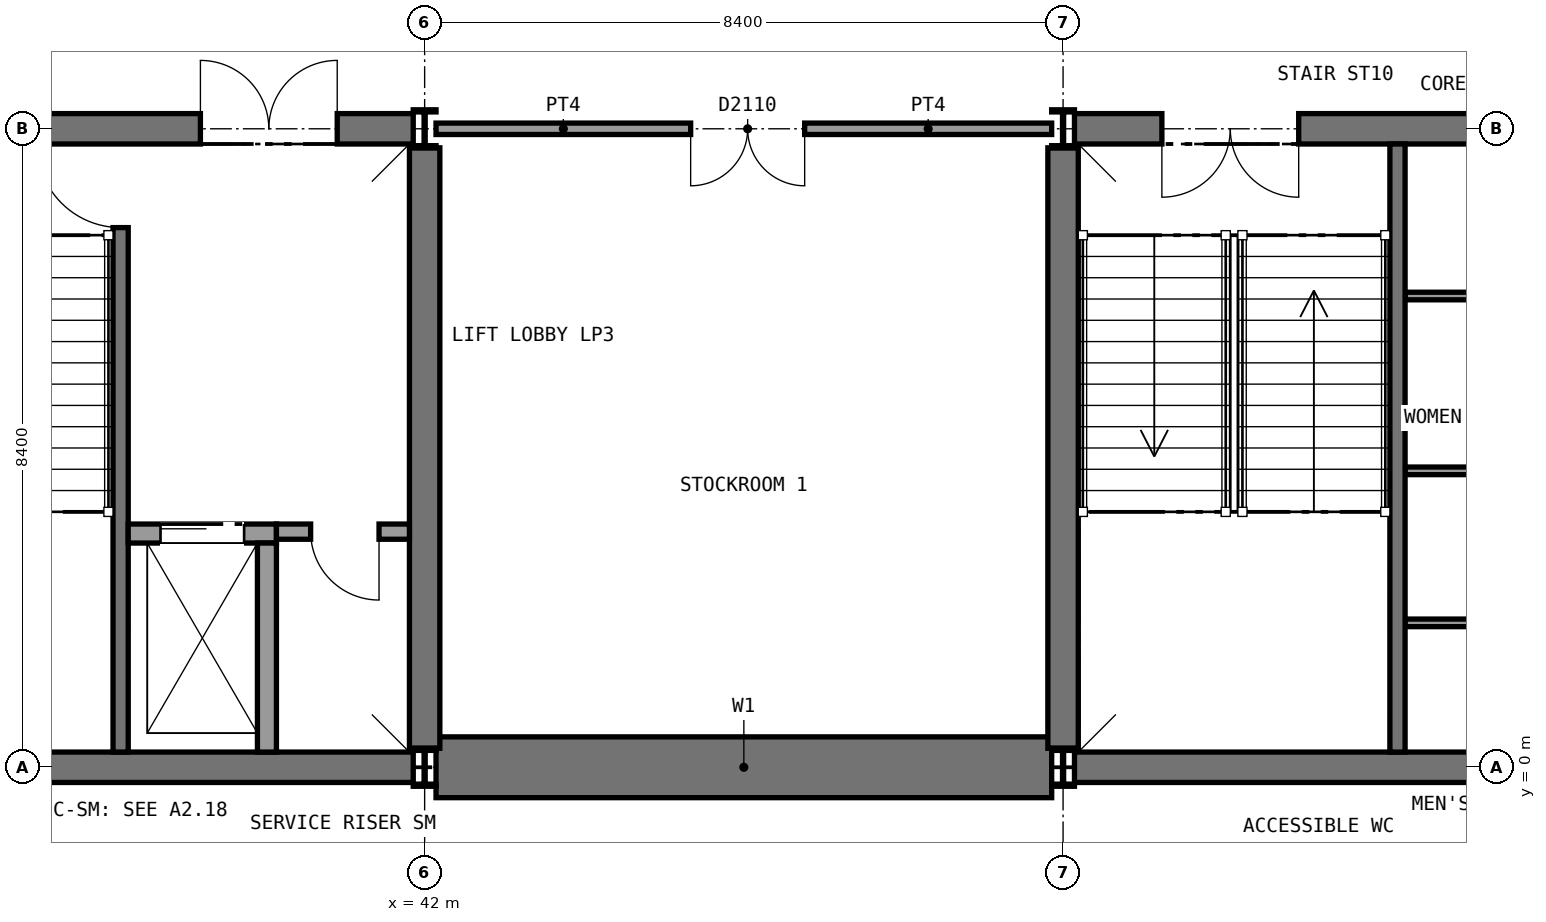
"""IFC4 building model, lengths in metres.
Left out: names, types, materials, properties, quantities, classifications, styles, units other than length and angle.
Written with IfcOpenShell. Run it as: python <this file> out.ifc"""

import sys

from ifc_helpers import new_model, si_unit, direction, frame, frame_2d, origin, origin_2d, place, context, subcontext, project, spatial, rectangle, i_section, extrude, element, fill, save


model = new_model("IFC4")
c1 = context("Model", 3, precision=1e-05, world=origin(), true_north=direction((0.0, 1.0)))
c2 = subcontext(c1, "Body", "Model", "MODEL_VIEW")
j1 = project(units=[si_unit("LENGTHUNIT", "METRE"), si_unit("PLANEANGLEUNIT", "RADIAN")], contexts=[c1])
p1 = place(None, origin())
s1 = spatial("IfcSite", under=j1, at=p1, CompositionType="ELEMENT")
p2 = place(p1, origin())
s2 = spatial("IfcBuilding", under=s1, at=p2, CompositionType="ELEMENT")
p3 = place(p2, frame((0.0, 0.0, -4.9)))
s3 = spatial("IfcBuildingStorey", under=s2, at=p3, CompositionType="ELEMENT", Elevation=-4.9)
p4 = place(p3, frame((42.15, 0.0, 0.0), z_axis=(0.0, 0.0, 1.0), x_axis=(1.0, 0.0, 0.0)))
e1 = element("IfcWall", 1, at=p4, inside=s3, PredefinedType="SOLIDWALL", context=c2, shape_type="SweptSolid", body=[
    extrude(rectangle(XDim=8.1, YDim=0.8, at=frame_2d((4.05, 0.0))), origin(), (0.0, 0.0, 1.0), 4.75),
])
p5 = place(p3, frame((33.75, 0.0, 0.0), z_axis=(0.0, 0.0, 1.0), x_axis=(1.0, 0.0, 0.0)))
e2 = element("IfcWall", 2, at=p5, inside=s3, PredefinedType="SHEAR", context=c2, shape_type="SweptSolid", body=[
    extrude(rectangle(XDim=8.1, YDim=0.4, at=frame_2d((4.05, 0.0))), origin(), (0.0, 0.0, 1.0), 4.75),
])
p6 = place(p3, frame((33.75, 8.4, 0.0), z_axis=(0.0, 0.0, 1.0), x_axis=(1.0, 0.0, 0.0)))
e3 = element("IfcWall", 3, at=p6, inside=s3, PredefinedType="SHEAR", context=c2, shape_type="SweptSolid", body=[
    extrude(rectangle(XDim=8.1, YDim=0.4, at=frame_2d((4.05, 0.0))), origin(), (0.0, 0.0, 1.0), 4.75),
])
p7 = place(p6, frame((1.15, 0.0, 0.0)))
e4 = element("IfcOpeningElement", 4, at=p7, cuts=e3, PredefinedType="OPENING", context=c2, shape_type="SweptSolid", body=[
    extrude(rectangle(XDim=1.8, YDim=2.1, at=frame_2d((0.9, 1.05))), frame((0.0, 0.21, 0.0), z_axis=(0.0, -1.0, 0.0), x_axis=(1.0, 0.0, 0.0)), (0.0, 0.0, 1.0), 0.42),
])
p8 = place(p6, frame((5.3, 0.0, 0.0)))
e5 = element("IfcOpeningElement", 5, at=p8, cuts=e3, PredefinedType="OPENING", context=c2, shape_type="SweptSolid", body=[
    extrude(rectangle(XDim=1.8, YDim=2.1, at=frame_2d((0.9, 1.05))), frame((0.0, 0.21, 0.0), z_axis=(0.0, -1.0, 0.0), x_axis=(1.0, 0.0, 0.0)), (0.0, 0.0, 1.0), 0.42),
])
p9 = place(p3, frame((42.0, 0.25, 0.0), z_axis=(0.0, 0.0, 1.0), x_axis=(0.0, 1.0, 0.0)))
e6 = element("IfcWall", 6, at=p9, inside=s3, PredefinedType="SHEAR", context=c2, shape_type="SweptSolid", body=[
    extrude(rectangle(XDim=7.9, YDim=0.4, at=frame_2d((3.95, 0.0))), origin(), (0.0, 0.0, 1.0), 4.75),
])
p10 = place(p3, frame((50.55, 0.0, 0.0), z_axis=(0.0, 0.0, 1.0), x_axis=(1.0, 0.0, 0.0)))
e7 = element("IfcWall", 7, at=p10, inside=s3, PredefinedType="SHEAR", context=c2, shape_type="SweptSolid", body=[
    extrude(rectangle(XDim=8.1, YDim=0.4, at=frame_2d((4.05, 0.0))), origin(), (0.0, 0.0, 1.0), 4.75),
])
p11 = place(p3, frame((50.55, 8.4, 0.0), z_axis=(0.0, 0.0, 1.0), x_axis=(1.0, 0.0, 0.0)))
e8 = element("IfcWall", 8, at=p11, inside=s3, PredefinedType="SHEAR", context=c2, shape_type="SweptSolid", body=[
    extrude(rectangle(XDim=8.1, YDim=0.4, at=frame_2d((4.05, 0.0))), origin(), (0.0, 0.0, 1.0), 4.75),
])
p12 = place(p11, frame((1.15, 0.0, 0.0)))
e9 = element("IfcOpeningElement", 9, at=p12, cuts=e8, PredefinedType="OPENING", context=c2, shape_type="SweptSolid", body=[
    extrude(rectangle(XDim=1.8, YDim=2.1, at=frame_2d((0.9, 1.05))), frame((0.0, 0.21, 0.0), z_axis=(0.0, -1.0, 0.0), x_axis=(1.0, 0.0, 0.0)), (0.0, 0.0, 1.0), 0.42),
])
p13 = place(p11, frame((5.6, 0.0, 0.0)))
e10 = element("IfcOpeningElement", 10, at=p13, cuts=e8, PredefinedType="OPENING", context=c2, shape_type="SweptSolid", body=[
    extrude(rectangle(XDim=1.2, YDim=2.1, at=frame_2d((0.6, 1.05))), frame((0.0, 0.21, 0.0), z_axis=(0.0, -1.0, 0.0), x_axis=(1.0, 0.0, 0.0)), (0.0, 0.0, 1.0), 0.42),
])
p14 = place(p3, frame((50.4, 0.25, 0.0), z_axis=(0.0, 0.0, 1.0), x_axis=(0.0, 1.0, 0.0)))
e11 = element("IfcWall", 11, at=p14, inside=s3, PredefinedType="SHEAR", context=c2, shape_type="SweptSolid", body=[
    extrude(rectangle(XDim=7.9, YDim=0.4, at=frame_2d((3.95, 0.0))), origin(), (0.0, 0.0, 1.0), 4.75),
])
for number, where, z_axis, x_axis in (
    (12, (42.0, 0.0, 0.0), (0.0, 0.0, 1.0), (1.0, 0.0, 0.0)),
    (13, (42.0, 8.4, 0.0), (0.0, 0.0, 1.0), (1.0, 0.0, 0.0)),
    (14, (50.4, 0.0, 0.0), (0.0, 0.0, 1.0), (1.0, 0.0, 0.0)),
    (15, (50.4, 8.4, 0.0), (0.0, 0.0, 1.0), (1.0, 0.0, 0.0)),
):
    element("IfcColumn", number, at=place(p3, frame(where, z_axis=z_axis, x_axis=x_axis)), inside=s3, PredefinedType="COLUMN", context=c2, shape_type="SweptSolid", body=[
        extrude(i_section(OverallWidth=0.3, OverallDepth=0.5, WebThickness=0.014, FlangeThickness=0.028, FilletRadius=0.027, at=origin_2d()), origin(), (0.0, 0.0, 1.0), 4.9),
    ])
p15 = place(p3, frame((54.9, 6.2, 0.0), z_axis=(0.0, 0.0, 1.0), x_axis=(1.0, 0.0, 0.0)))
e16 = element("IfcWall", 16, at=p15, inside=s3, PredefinedType="PARTITIONING", context=c2, shape_type="SweptSolid", body=[
    extrude(rectangle(XDim=2.4, YDim=0.1, at=frame_2d((1.2, 0.0))), origin(), (0.0, 0.0, 1.0), 4.68),
])
p16 = place(p15, frame((0.85, 0.0, 0.0)))
e17 = element("IfcOpeningElement", 17, at=p16, cuts=e16, PredefinedType="OPENING", context=c2, shape_type="SweptSolid", body=[
    extrude(rectangle(XDim=0.9, YDim=2.1, at=frame_2d((0.45, 1.05))), frame((0.0, 0.06, 0.0), z_axis=(0.0, -1.0, 0.0), x_axis=(1.0, 0.0, 0.0)), (0.0, 0.0, 1.0), 0.12),
])
for number, where, z_axis, x_axis in (
    (18, (54.9, 3.9, 0.0), (0.0, 0.0, 1.0), (1.0, 0.0, 0.0)),
    (19, (54.9, 1.9, 0.0), (0.0, 0.0, 1.0), (1.0, 0.0, 0.0)),
):
    element("IfcWall", number, at=place(p3, frame(where, z_axis=z_axis, x_axis=x_axis)), inside=s3, PredefinedType="PARTITIONING", context=c2, shape_type="SweptSolid", body=[
        extrude(rectangle(XDim=2.4, YDim=0.1, at=frame_2d((1.2, 0.0))), origin(), (0.0, 0.0, 1.0), 4.68),
    ])
p17 = place(p3, frame((42.15, 8.4, 0.0), z_axis=(0.0, 0.0, 1.0), x_axis=(1.0, 0.0, 0.0)))
e20 = element("IfcWall", 20, at=p17, inside=s3, PredefinedType="SOLIDWALL", context=c2, shape_type="SweptSolid", body=[
    extrude(rectangle(XDim=8.1, YDim=0.15, at=frame_2d((4.05, 0.0))), origin(), (0.0, 0.0, 1.0), 4.26),
])
p18 = place(p17, frame((3.35, 0.0, 0.0)))
e21 = element("IfcOpeningElement", 21, at=p18, cuts=e20, PredefinedType="OPENING", context=c2, shape_type="SweptSolid", body=[
    extrude(rectangle(XDim=1.5, YDim=2.1, at=frame_2d((0.75, 1.05))), frame((0.0, 0.085, 0.0), z_axis=(0.0, -1.0, 0.0), x_axis=(1.0, 0.0, 0.0)), (0.0, 0.0, 1.0), 0.17),
])
p19 = place(p3, frame((38.0, 0.2, 0.0), z_axis=(0.0, 0.0, 1.0), x_axis=(0.0, 1.0, 0.0)))
e22 = element("IfcWall", 22, at=p19, inside=s3, PredefinedType="SHEAR", context=c2, shape_type="SweptSolid", body=[
    extrude(rectangle(XDim=8.0, YDim=0.2, at=frame_2d((4.0, 0.0))), origin(), (0.0, 0.0, 1.0), 4.75),
])
p20 = place(p19, frame((6.9, 0.0, 0.0)))
e23 = element("IfcOpeningElement", 23, at=p20, cuts=e22, PredefinedType="OPENING", context=c2, shape_type="SweptSolid", body=[
    extrude(rectangle(XDim=1.11, YDim=2.1, at=frame_2d((0.555, 1.05))), frame((0.0, 0.11, 0.0), z_axis=(0.0, -1.0, 0.0), x_axis=(1.0, 0.0, 0.0)), (0.0, 0.0, 1.0), 0.22),
])
p21 = place(p3, frame((38.1, 3.075, 0.0), z_axis=(0.0, 0.0, 1.0), x_axis=(1.0, 0.0, 0.0)))
e24 = element("IfcWall", 24, at=p21, inside=s3, PredefinedType="SOLIDWALL", context=c2, shape_type="SweptSolid", body=[
    extrude(rectangle(XDim=1.95, YDim=0.25, at=frame_2d((0.975, 0.0))), origin(), (0.0, 0.0, 1.0), 4.9),
])
p22 = place(p21, frame((0.425, 0.0, 0.0)))
e25 = element("IfcOpeningElement", 25, at=p22, cuts=e24, PredefinedType="OPENING", context=c2, shape_type="SweptSolid", body=[
    extrude(rectangle(XDim=1.1, YDim=2.1, at=frame_2d((0.55, 1.05))), frame((0.0, 0.135, 0.0), z_axis=(0.0, -1.0, 0.0), x_axis=(1.0, 0.0, 0.0)), (0.0, 0.0, 1.0), 0.27),
])
p23 = place(p3, frame((39.925, 0.2, 0.0), z_axis=(0.0, 0.0, 1.0), x_axis=(0.0, 1.0, 0.0)))
e26 = element("IfcWall", 26, at=p23, inside=s3, PredefinedType="SOLIDWALL", context=c2, shape_type="SweptSolid", body=[
    extrude(rectangle(XDim=2.75, YDim=0.25, at=frame_2d((1.375, 0.0))), origin(), (0.0, 0.0, 1.0), 4.9),
])
p24 = place(p3, frame((40.05, 3.1, 0.0), z_axis=(0.0, 0.0, 1.0), x_axis=(1.0, 0.0, 0.0)))
e27 = element("IfcWall", 27, at=p24, inside=s3, PredefinedType="PARTITIONING", context=c2, shape_type="SweptSolid", body=[
    extrude(rectangle(XDim=1.75, YDim=0.2, at=frame_2d((0.875, 0.0))), origin(), (0.0, 0.0, 1.0), 4.75),
])
p25 = place(p24, frame((0.45, 0.0, 0.0)))
e28 = element("IfcOpeningElement", 28, at=p25, cuts=e27, PredefinedType="OPENING", context=c2, shape_type="SweptSolid", body=[
    extrude(rectangle(XDim=0.9, YDim=2.1, at=frame_2d((0.45, 1.05))), frame((0.0, 0.11, 0.0), z_axis=(0.0, -1.0, 0.0), x_axis=(1.0, 0.0, 0.0)), (0.0, 0.0, 1.0), 0.22),
])
p26 = place(p3, frame((54.8, 0.2, 0.0), z_axis=(0.0, 0.0, 1.0), x_axis=(0.0, 1.0, 0.0)))
e29 = element("IfcWall", 29, at=p26, inside=s3, PredefinedType="SHEAR", context=c2, shape_type="SweptSolid", body=[
    extrude(rectangle(XDim=8.0, YDim=0.2, at=frame_2d((4.0, 0.0))), origin(), (0.0, 0.0, 1.0), 4.75),
])
p27 = place(p18, frame((1.5, 0.0, 0.0), z_axis=(0.0, 0.0, 1.0), x_axis=(-1.0, 0.0, 0.0)))
e30 = element("IfcDoor", 30, at=p27, inside=s3, OperationType="DOUBLE_DOOR_SINGLE_SWING", PredefinedType="DOOR", context=c2, shape_type="SweptSolid", body=[
    extrude(rectangle(XDim=1.5, YDim=2.1, at=frame_2d((0.75, 1.05))), frame((0.0, 0.025, 0.0), z_axis=(0.0, -1.0, 0.0), x_axis=(1.0, 0.0, 0.0)), (0.0, 0.0, 1.0), 0.05),
])
fill(e21, e30)
p28 = place(p20, origin())
e31 = element("IfcDoor", 31, at=p28, inside=s3, OperationType="SINGLE_SWING_RIGHT", PredefinedType="DOOR", context=c2, shape_type="SweptSolid", body=[
    extrude(rectangle(XDim=1.1, YDim=2.1, at=frame_2d((0.55, 1.05))), frame((0.0, 0.025, 0.0), z_axis=(0.0, -1.0, 0.0), x_axis=(1.0, 0.0, 0.0)), (0.0, 0.0, 1.0), 0.05),
])
fill(e23, e31)
p29 = place(p22, origin())
e32 = element("IfcDoor", 32, at=p29, inside=s3, OperationType="SLIDING_TO_LEFT", PredefinedType="DOOR", context=c2, shape_type="SweptSolid", body=[
    extrude(rectangle(XDim=1.1, YDim=2.1, at=frame_2d((0.55, 1.05))), frame((0.0, 0.025, 0.0), z_axis=(0.0, -1.0, 0.0), x_axis=(1.0, 0.0, 0.0)), (0.0, 0.0, 1.0), 0.05),
])
fill(e25, e32)
p30 = place(p25, frame((0.9, 0.0, 0.0), z_axis=(0.0, 0.0, 1.0), x_axis=(-1.0, 0.0, 0.0)))
e33 = element("IfcDoor", 33, at=p30, inside=s3, OperationType="SINGLE_SWING_LEFT", PredefinedType="DOOR", context=c2, shape_type="SweptSolid", body=[
    extrude(rectangle(XDim=0.9, YDim=2.1, at=frame_2d((0.45, 1.05))), frame((0.0, 0.025, 0.0), z_axis=(0.0, -1.0, 0.0), x_axis=(1.0, 0.0, 0.0)), (0.0, 0.0, 1.0), 0.05),
])
fill(e28, e33)
p31 = place(p8, origin())
e34 = element("IfcDoor", 34, at=p31, inside=s3, OperationType="DOUBLE_DOOR_SINGLE_SWING", PredefinedType="DOOR", context=c2, shape_type="SweptSolid", body=[
    extrude(rectangle(XDim=1.8, YDim=2.1, at=frame_2d((0.9, 1.05))), frame((0.0, 0.025, 0.0), z_axis=(0.0, -1.0, 0.0), x_axis=(1.0, 0.0, 0.0)), (0.0, 0.0, 1.0), 0.05),
])
fill(e5, e34)
p32 = place(p12, frame((1.8, 0.0, 0.0), z_axis=(0.0, 0.0, 1.0), x_axis=(-1.0, 0.0, 0.0)))
e35 = element("IfcDoor", 35, at=p32, inside=s3, OperationType="DOUBLE_DOOR_SINGLE_SWING", PredefinedType="DOOR", context=c2, shape_type="SweptSolid", body=[
    extrude(rectangle(XDim=1.8, YDim=2.1, at=frame_2d((0.9, 1.05))), frame((0.0, 0.025, 0.0), z_axis=(0.0, -1.0, 0.0), x_axis=(1.0, 0.0, 0.0)), (0.0, 0.0, 1.0), 0.05),
])
fill(e9, e35)
save(model, sys.argv[1])
